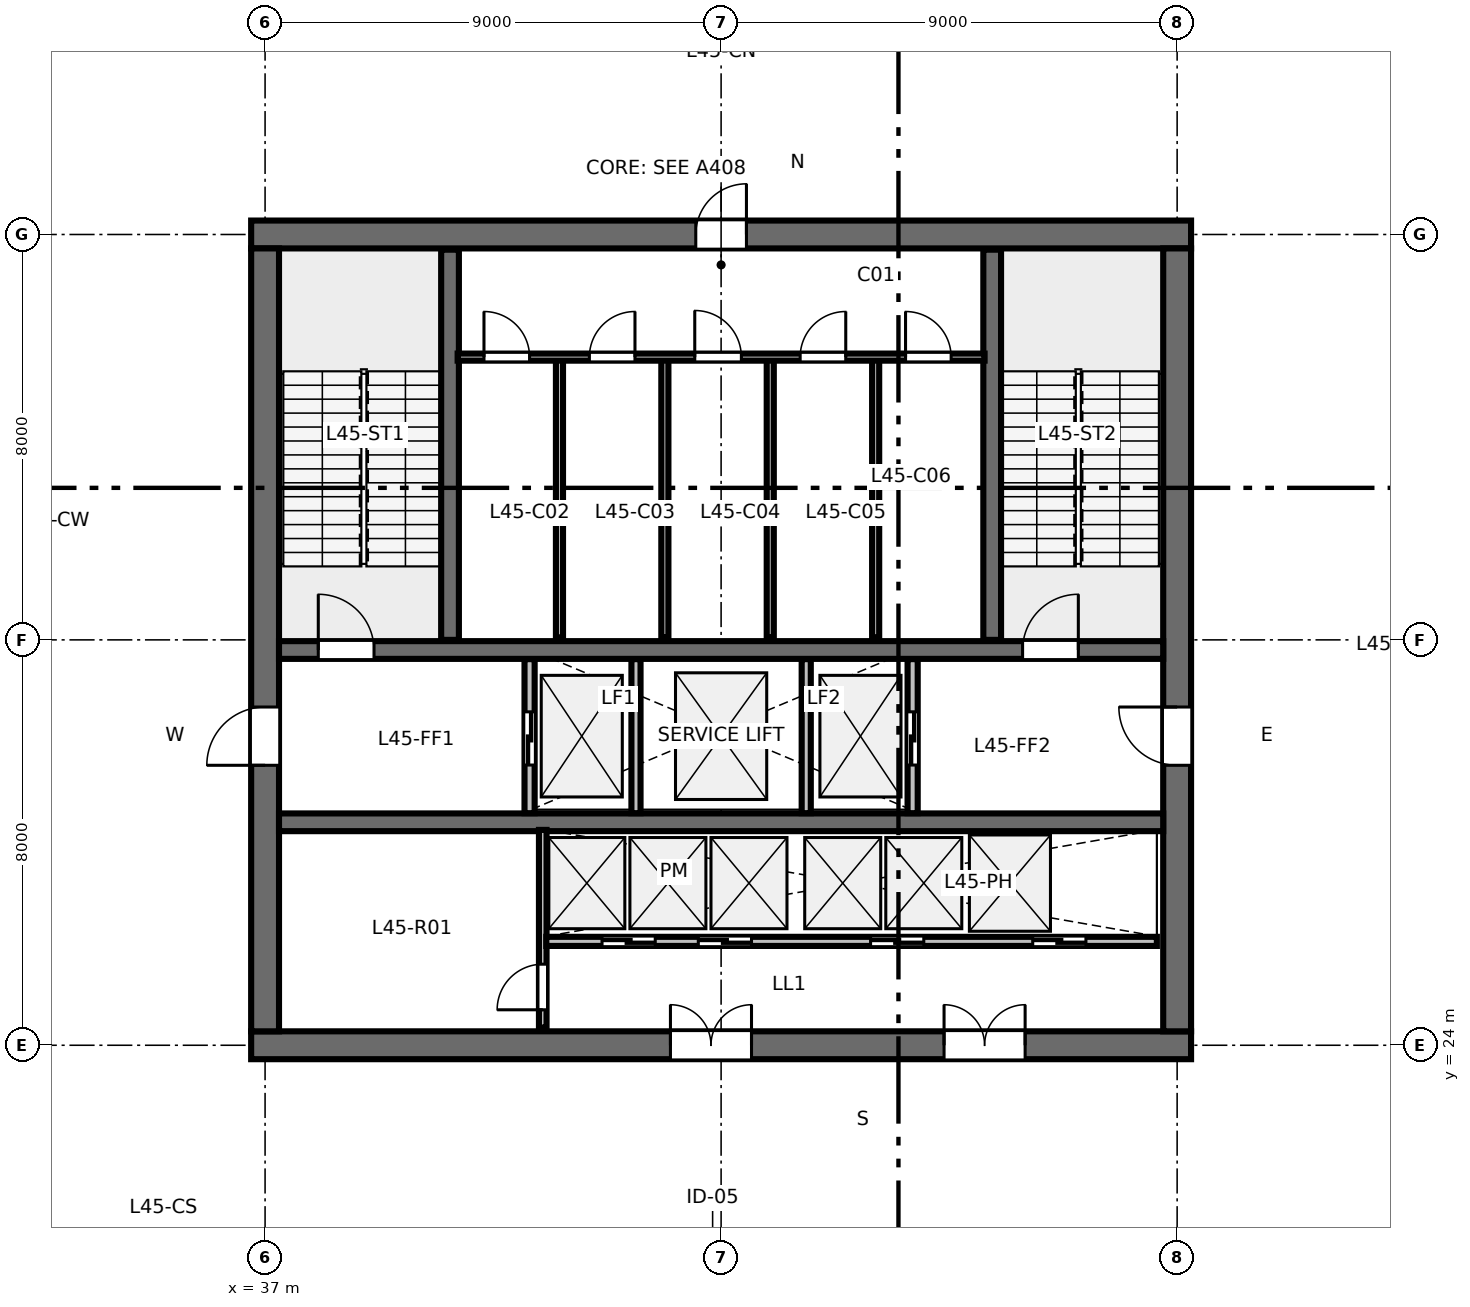
"""IFC4 building model, lengths in metres.
Left out: names, types, materials, properties, quantities, classifications, styles, units other than length and angle.
Written with IfcOpenShell. Run it as: python <this file> out.ifc"""

import sys

from ifc_helpers import new_model, si_unit, direction, frame, frame_2d, origin, place, context, subcontext, project, spatial, rectangle, extrude, element, fill, save


model = new_model("IFC4")
c1 = context("Model", 3, precision=1e-05, world=origin(), true_north=direction((0.0, 1.0)))
c2 = subcontext(c1, "Body", "Model", "MODEL_VIEW")
j1 = project(units=[si_unit("LENGTHUNIT", "METRE"), si_unit("PLANEANGLEUNIT", "RADIAN")], contexts=[c1])
p1 = place(None, origin())
s1 = spatial("IfcSite", under=j1, at=p1, CompositionType="ELEMENT")
p2 = place(p1, origin())
s2 = spatial("IfcBuilding", under=s1, at=p2, CompositionType="ELEMENT")
p3 = place(p2, frame((0.0, 0.0, 172.0)))
s3 = spatial("IfcBuildingStorey", under=s2, at=p3, CompositionType="ELEMENT", Elevation=172.0)
p4 = place(p3, frame((36.725, 24.0, 0.0), z_axis=(0.0, 0.0, 1.0), x_axis=(1.0, 0.0, 0.0)))
e1 = element("IfcWall", 1, at=p4, inside=s3, PredefinedType="SHEAR", context=c2, shape_type="SweptSolid", body=[
    extrude(rectangle(XDim=18.55, YDim=0.55, at=frame_2d((9.275, 0.0))), origin(), (0.0, 0.0, 1.0), 4.76),
])
p5 = place(p4, frame((8.275, 0.0, 0.0)))
e2 = element("IfcOpeningElement", 2, at=p5, cuts=e1, PredefinedType="OPENING", context=c2, shape_type="SweptSolid", body=[
    extrude(rectangle(XDim=1.6, YDim=2.15, at=frame_2d((0.8, 1.075))), frame((0.0, 0.285, 0.0), z_axis=(0.0, -1.0, 0.0), x_axis=(1.0, 0.0, 0.0)), (0.0, 0.0, 1.0), 0.57),
])
p6 = place(p4, frame((13.675, 0.0, 0.0)))
e3 = element("IfcOpeningElement", 3, at=p6, cuts=e1, PredefinedType="OPENING", context=c2, shape_type="SweptSolid", body=[
    extrude(rectangle(XDim=1.6, YDim=2.15, at=frame_2d((0.8, 1.075))), frame((0.0, 0.285, 0.0), z_axis=(0.0, -1.0, 0.0), x_axis=(1.0, 0.0, 0.0)), (0.0, 0.0, 1.0), 0.57),
])
p7 = place(p3, frame((36.725, 40.0, 0.0), z_axis=(0.0, 0.0, 1.0), x_axis=(1.0, 0.0, 0.0)))
e4 = element("IfcWall", 4, at=p7, inside=s3, PredefinedType="SHEAR", context=c2, shape_type="SweptSolid", body=[
    extrude(rectangle(XDim=18.55, YDim=0.55, at=frame_2d((9.275, 0.0))), origin(), (0.0, 0.0, 1.0), 4.76),
])
p8 = place(p7, frame((8.775, 0.0, 0.0)))
e5 = element("IfcOpeningElement", 5, at=p8, cuts=e4, PredefinedType="OPENING", context=c2, shape_type="SweptSolid", body=[
    extrude(rectangle(XDim=1.0, YDim=2.15, at=frame_2d((0.5, 1.075))), frame((0.0, 0.285, 0.0), z_axis=(0.0, -1.0, 0.0), x_axis=(1.0, 0.0, 0.0)), (0.0, 0.0, 1.0), 0.57),
])
p9 = place(p3, frame((37.0, 24.275, 0.0), z_axis=(0.0, 0.0, 1.0), x_axis=(0.0, 1.0, 0.0)))
e6 = element("IfcWall", 6, at=p9, inside=s3, PredefinedType="SHEAR", context=c2, shape_type="SweptSolid", body=[
    extrude(rectangle(XDim=15.45, YDim=0.55, at=frame_2d((7.725, 0.0))), origin(), (0.0, 0.0, 1.0), 4.76),
])
p10 = place(p9, frame((5.25, 0.0, 0.0)))
e7 = element("IfcOpeningElement", 7, at=p10, cuts=e6, PredefinedType="OPENING", context=c2, shape_type="SweptSolid", body=[
    extrude(rectangle(XDim=1.15, YDim=2.15, at=frame_2d((0.575, 1.075))), frame((0.0, 0.285, 0.0), z_axis=(0.0, -1.0, 0.0), x_axis=(1.0, 0.0, 0.0)), (0.0, 0.0, 1.0), 0.57),
])
p11 = place(p3, frame((55.0, 24.275, 0.0), z_axis=(0.0, 0.0, 1.0), x_axis=(0.0, 1.0, 0.0)))
e8 = element("IfcWall", 8, at=p11, inside=s3, PredefinedType="SHEAR", context=c2, shape_type="SweptSolid", body=[
    extrude(rectangle(XDim=15.45, YDim=0.55, at=frame_2d((7.725, 0.0))), origin(), (0.0, 0.0, 1.0), 4.76),
])
p12 = place(p11, frame((5.25, 0.0, 0.0)))
e9 = element("IfcOpeningElement", 9, at=p12, cuts=e8, PredefinedType="OPENING", context=c2, shape_type="SweptSolid", body=[
    extrude(rectangle(XDim=1.15, YDim=2.15, at=frame_2d((0.575, 1.075))), frame((0.0, 0.285, 0.0), z_axis=(0.0, -1.0, 0.0), x_axis=(1.0, 0.0, 0.0)), (0.0, 0.0, 1.0), 0.57),
])
p13 = place(p3, frame((37.275, 31.8, 0.0), z_axis=(0.0, 0.0, 1.0), x_axis=(1.0, 0.0, 0.0)))
e10 = element("IfcWall", 10, at=p13, inside=s3, PredefinedType="SHEAR", context=c2, shape_type="SweptSolid", body=[
    extrude(rectangle(XDim=17.45, YDim=0.35, at=frame_2d((8.725, 0.0))), origin(), (0.0, 0.0, 1.0), 4.76),
])
p14 = place(p13, frame((0.775, 0.0, 0.0)))
e11 = element("IfcOpeningElement", 11, at=p14, cuts=e10, PredefinedType="OPENING", context=c2, shape_type="SweptSolid", body=[
    extrude(rectangle(XDim=1.1, YDim=2.15, at=frame_2d((0.55, 1.075))), frame((0.0, 0.185, 0.0), z_axis=(0.0, -1.0, 0.0), x_axis=(1.0, 0.0, 0.0)), (0.0, 0.0, 1.0), 0.37),
])
p15 = place(p13, frame((14.675, 0.0, 0.0)))
e12 = element("IfcOpeningElement", 12, at=p15, cuts=e10, PredefinedType="OPENING", context=c2, shape_type="SweptSolid", body=[
    extrude(rectangle(XDim=1.1, YDim=2.15, at=frame_2d((0.55, 1.075))), frame((0.0, 0.185, 0.0), z_axis=(0.0, -1.0, 0.0), x_axis=(1.0, 0.0, 0.0)), (0.0, 0.0, 1.0), 0.37),
])
p16 = place(p3, frame((37.275, 28.4, 0.0), z_axis=(0.0, 0.0, 1.0), x_axis=(1.0, 0.0, 0.0)))
e13 = element("IfcWall", 13, at=p16, inside=s3, PredefinedType="SHEAR", context=c2, shape_type="SweptSolid", body=[
    extrude(rectangle(XDim=17.45, YDim=0.35, at=frame_2d((8.725, 0.0))), origin(), (0.0, 0.0, 1.0), 4.76),
])
for number, where, z_axis, x_axis in (
    (14, (40.65, 32.0, 0.0), (0.0, 0.0, 1.0), (0.0, 1.0, 0.0)),
    (15, (51.35, 32.0, 0.0), (0.0, 0.0, 1.0), (0.0, 1.0, 0.0)),
):
    element("IfcWall", number, at=place(p3, frame(where, z_axis=z_axis, x_axis=x_axis)), inside=s3, PredefinedType="SHEAR", context=c2, shape_type="SweptSolid", body=[
        extrude(rectangle(XDim=7.7, YDim=0.35, at=frame_2d((3.85, 0.0))), origin(), (0.0, 0.0, 1.0), 5.0),
    ])
for number, where, z_axis, x_axis in (
    (16, (42.81, 32.05, 0.0), (0.0, 0.0, 1.0), (0.0, 1.0, 0.0)),
    (17, (44.89, 32.05, 0.0), (0.0, 0.0, 1.0), (0.0, 1.0, 0.0)),
    (18, (46.97, 32.05, 0.0), (0.0, 0.0, 1.0), (0.0, 1.0, 0.0)),
    (19, (49.05, 32.05, 0.0), (0.0, 0.0, 1.0), (0.0, 1.0, 0.0)),
):
    element("IfcWall", number, at=place(p3, frame(where, z_axis=z_axis, x_axis=x_axis)), inside=s3, PredefinedType="PARTITIONING", context=c2, shape_type="SweptSolid", body=[
        extrude(rectangle(XDim=5.5, YDim=0.14, at=frame_2d((2.75, 0.0))), origin(), (0.0, 0.0, 1.0), 4.76),
    ])
p17 = place(p3, frame((40.8, 37.58, 0.0), z_axis=(0.0, 0.0, 1.0), x_axis=(1.0, 0.0, 0.0)))
e20 = element("IfcWall", 20, at=p17, inside=s3, PredefinedType="PARTITIONING", context=c2, shape_type="SweptSolid", body=[
    extrude(rectangle(XDim=10.4, YDim=0.14, at=frame_2d((5.2, 0.0))), origin(), (0.0, 0.0, 1.0), 4.76),
])
p18 = place(p17, frame((0.52, 0.0, 0.0)))
e21 = element("IfcOpeningElement", 21, at=p18, cuts=e20, PredefinedType="OPENING", context=c2, shape_type="SweptSolid", body=[
    extrude(rectangle(XDim=0.9, YDim=2.15, at=frame_2d((0.45, 1.075))), frame((0.0, 0.08, 0.0), z_axis=(0.0, -1.0, 0.0), x_axis=(1.0, 0.0, 0.0)), (0.0, 0.0, 1.0), 0.16),
])
p19 = place(p17, frame((2.6, 0.0, 0.0)))
e22 = element("IfcOpeningElement", 22, at=p19, cuts=e20, PredefinedType="OPENING", context=c2, shape_type="SweptSolid", body=[
    extrude(rectangle(XDim=0.9, YDim=2.15, at=frame_2d((0.45, 1.075))), frame((0.0, 0.08, 0.0), z_axis=(0.0, -1.0, 0.0), x_axis=(1.0, 0.0, 0.0)), (0.0, 0.0, 1.0), 0.16),
])
p20 = place(p17, frame((4.68, 0.0, 0.0)))
e23 = element("IfcOpeningElement", 23, at=p20, cuts=e20, PredefinedType="OPENING", context=c2, shape_type="SweptSolid", body=[
    extrude(rectangle(XDim=0.92, YDim=2.15, at=frame_2d((0.46, 1.075))), frame((0.0, 0.08, 0.0), z_axis=(0.0, -1.0, 0.0), x_axis=(1.0, 0.0, 0.0)), (0.0, 0.0, 1.0), 0.16),
])
p21 = place(p17, frame((6.76, 0.0, 0.0)))
e24 = element("IfcOpeningElement", 24, at=p21, cuts=e20, PredefinedType="OPENING", context=c2, shape_type="SweptSolid", body=[
    extrude(rectangle(XDim=0.9, YDim=2.15, at=frame_2d((0.45, 1.075))), frame((0.0, 0.08, 0.0), z_axis=(0.0, -1.0, 0.0), x_axis=(1.0, 0.0, 0.0)), (0.0, 0.0, 1.0), 0.16),
])
p22 = place(p17, frame((8.84, 0.0, 0.0)))
e25 = element("IfcOpeningElement", 25, at=p22, cuts=e20, PredefinedType="OPENING", context=c2, shape_type="SweptSolid", body=[
    extrude(rectangle(XDim=0.9, YDim=2.15, at=frame_2d((0.45, 1.075))), frame((0.0, 0.08, 0.0), z_axis=(0.0, -1.0, 0.0), x_axis=(1.0, 0.0, 0.0)), (0.0, 0.0, 1.0), 0.16),
])
p23 = place(p3, frame((42.22, 28.58, 0.0), z_axis=(0.0, 0.0, 1.0), x_axis=(0.0, 1.0, 0.0)))
e26 = element("IfcWall", 26, at=p23, inside=s3, PredefinedType="PARTITIONING", context=c2, shape_type="SweptSolid", body=[
    extrude(rectangle(XDim=3.04, YDim=0.2, at=frame_2d((1.52, 0.0))), origin(), (0.0, 0.0, 1.0), 4.76),
])
p24 = place(p23, frame((0.95, 0.0, 0.0)))
e27 = element("IfcOpeningElement", 27, at=p24, cuts=e26, PredefinedType="OPENING", context=c2, shape_type="SweptSolid", body=[
    extrude(rectangle(XDim=1.05, YDim=2.15, at=frame_2d((0.525, 1.075))), frame((0.0, 0.11, 0.0), z_axis=(0.0, -1.0, 0.0), x_axis=(1.0, 0.0, 0.0)), (0.0, 0.0, 1.0), 0.22),
])
p25 = place(p3, frame((49.78, 28.58, 0.0), z_axis=(0.0, 0.0, 1.0), x_axis=(0.0, 1.0, 0.0)))
e28 = element("IfcWall", 28, at=p25, inside=s3, PredefinedType="PARTITIONING", context=c2, shape_type="SweptSolid", body=[
    extrude(rectangle(XDim=3.04, YDim=0.2, at=frame_2d((1.52, 0.0))), origin(), (0.0, 0.0, 1.0), 4.76),
])
p26 = place(p25, frame((0.95, 0.0, 0.0)))
e29 = element("IfcOpeningElement", 29, at=p26, cuts=e28, PredefinedType="OPENING", context=c2, shape_type="SweptSolid", body=[
    extrude(rectangle(XDim=1.05, YDim=2.15, at=frame_2d((0.525, 1.075))), frame((0.0, 0.11, 0.0), z_axis=(0.0, -1.0, 0.0), x_axis=(1.0, 0.0, 0.0)), (0.0, 0.0, 1.0), 0.22),
])
for number, where, z_axis, x_axis in (
    (30, (44.32, 28.58, 0.0), (0.0, 0.0, 1.0), (0.0, 1.0, 0.0)),
    (31, (47.68, 28.58, 0.0), (0.0, 0.0, 1.0), (0.0, 1.0, 0.0)),
):
    element("IfcWall", number, at=place(p3, frame(where, z_axis=z_axis, x_axis=x_axis)), inside=s3, PredefinedType="PARTITIONING", context=c2, shape_type="SweptSolid", body=[
        extrude(rectangle(XDim=3.04, YDim=0.18, at=frame_2d((1.52, 0.0))), origin(), (0.0, 0.0, 1.0), 4.76),
    ])
p27 = place(p3, frame((42.48, 24.35, 0.0), z_axis=(0.0, 0.0, 1.0), x_axis=(0.0, 1.0, 0.0)))
e32 = element("IfcWall", 32, at=p27, inside=s3, PredefinedType="PARTITIONING", context=c2, shape_type="SweptSolid", body=[
    extrude(rectangle(XDim=3.9, YDim=0.15, at=frame_2d((1.95, 0.0))), origin(), (0.0, 0.0, 1.0), 4.76),
])
p28 = place(p27, frame((0.35, 0.0, 0.0)))
e33 = element("IfcOpeningElement", 33, at=p28, cuts=e32, PredefinedType="OPENING", context=c2, shape_type="SweptSolid", body=[
    extrude(rectangle(XDim=0.9, YDim=2.15, at=frame_2d((0.45, 1.075))), frame((0.0, 0.085, 0.0), z_axis=(0.0, -1.0, 0.0), x_axis=(1.0, 0.0, 0.0)), (0.0, 0.0, 1.0), 0.17),
])
p29 = place(p3, frame((42.55, 26.05, 0.0), z_axis=(0.0, 0.0, 1.0), x_axis=(1.0, 0.0, 0.0)))
e34 = element("IfcWall", 34, at=p29, inside=s3, PredefinedType="PARTITIONING", context=c2, shape_type="SweptSolid", body=[
    extrude(rectangle(XDim=12.05, YDim=0.18, at=frame_2d((6.025, 0.0))), origin(), (0.0, 0.0, 1.0), 4.76),
])
p30 = place(p29, frame((1.1, 0.0, 0.0)))
e35 = element("IfcOpeningElement", 35, at=p30, cuts=e34, PredefinedType="OPENING", context=c2, shape_type="SweptSolid", body=[
    extrude(rectangle(XDim=1.05, YDim=2.15, at=frame_2d((0.525, 1.075))), frame((0.0, 0.1, 0.0), z_axis=(0.0, -1.0, 0.0), x_axis=(1.0, 0.0, 0.0)), (0.0, 0.0, 1.0), 0.2),
])
p31 = place(p29, frame((3.0, 0.0, 0.0)))
e36 = element("IfcOpeningElement", 36, at=p31, cuts=e34, PredefinedType="OPENING", context=c2, shape_type="SweptSolid", body=[
    extrude(rectangle(XDim=1.05, YDim=2.15, at=frame_2d((0.525, 1.075))), frame((0.0, 0.1, 0.0), z_axis=(0.0, -1.0, 0.0), x_axis=(1.0, 0.0, 0.0)), (0.0, 0.0, 1.0), 0.2),
])
p32 = place(p29, frame((6.4, 0.0, 0.0)))
e37 = element("IfcOpeningElement", 37, at=p32, cuts=e34, PredefinedType="OPENING", context=c2, shape_type="SweptSolid", body=[
    extrude(rectangle(XDim=1.05, YDim=2.15, at=frame_2d((0.525, 1.075))), frame((0.0, 0.1, 0.0), z_axis=(0.0, -1.0, 0.0), x_axis=(1.0, 0.0, 0.0)), (0.0, 0.0, 1.0), 0.2),
])
p33 = place(p29, frame((9.6, 0.0, 0.0)))
e38 = element("IfcOpeningElement", 38, at=p33, cuts=e34, PredefinedType="OPENING", context=c2, shape_type="SweptSolid", body=[
    extrude(rectangle(XDim=1.05, YDim=2.15, at=frame_2d((0.525, 1.075))), frame((0.0, 0.1, 0.0), z_axis=(0.0, -1.0, 0.0), x_axis=(1.0, 0.0, 0.0)), (0.0, 0.0, 1.0), 0.2),
])
p34 = place(p14, origin())
e39 = element("IfcDoor", 39, at=p34, inside=s3, OperationType="SINGLE_SWING_LEFT", PredefinedType="DOOR", context=c2, shape_type="SweptSolid", body=[
    extrude(rectangle(XDim=1.1, YDim=2.15, at=frame_2d((0.55, 1.075))), frame((0.0, 0.025, 0.0), z_axis=(0.0, -1.0, 0.0), x_axis=(1.0, 0.0, 0.0)), (0.0, 0.0, 1.0), 0.05),
])
fill(e11, e39)
p35 = place(p15, origin())
e40 = element("IfcDoor", 40, at=p35, inside=s3, OperationType="SINGLE_SWING_RIGHT", PredefinedType="DOOR", context=c2, shape_type="SweptSolid", body=[
    extrude(rectangle(XDim=1.1, YDim=2.15, at=frame_2d((0.55, 1.075))), frame((0.0, 0.025, 0.0), z_axis=(0.0, -1.0, 0.0), x_axis=(1.0, 0.0, 0.0)), (0.0, 0.0, 1.0), 0.05),
])
fill(e12, e40)
p36 = place(p8, origin())
e41 = element("IfcDoor", 41, at=p36, inside=s3, OperationType="SINGLE_SWING_RIGHT", PredefinedType="DOOR", context=c2, shape_type="SweptSolid", body=[
    extrude(rectangle(XDim=1.0, YDim=2.15, at=frame_2d((0.5, 1.075))), frame((0.0, 0.025, 0.0), z_axis=(0.0, -1.0, 0.0), x_axis=(1.0, 0.0, 0.0)), (0.0, 0.0, 1.0), 0.05),
])
fill(e5, e41)
p37 = place(p10, origin())
e42 = element("IfcDoor", 42, at=p37, inside=s3, OperationType="SINGLE_SWING_LEFT", PredefinedType="DOOR", context=c2, shape_type="SweptSolid", body=[
    extrude(rectangle(XDim=1.15, YDim=2.15, at=frame_2d((0.575, 1.075))), frame((0.0, 0.025, 0.0), z_axis=(0.0, -1.0, 0.0), x_axis=(1.0, 0.0, 0.0)), (0.0, 0.0, 1.0), 0.05),
])
fill(e7, e42)
p38 = place(p12, origin())
e43 = element("IfcDoor", 43, at=p38, inside=s3, OperationType="SINGLE_SWING_RIGHT", PredefinedType="DOOR", context=c2, shape_type="SweptSolid", body=[
    extrude(rectangle(XDim=1.15, YDim=2.15, at=frame_2d((0.575, 1.075))), frame((0.0, 0.025, 0.0), z_axis=(0.0, -1.0, 0.0), x_axis=(1.0, 0.0, 0.0)), (0.0, 0.0, 1.0), 0.05),
])
fill(e9, e43)
p39 = place(p5, origin())
e44 = element("IfcDoor", 44, at=p39, inside=s3, OperationType="DOUBLE_DOOR_SINGLE_SWING", PredefinedType="DOOR", context=c2, shape_type="SweptSolid", body=[
    extrude(rectangle(XDim=1.6, YDim=2.15, at=frame_2d((0.8, 1.075))), frame((0.0, 0.025, 0.0), z_axis=(0.0, -1.0, 0.0), x_axis=(1.0, 0.0, 0.0)), (0.0, 0.0, 1.0), 0.05),
])
fill(e2, e44)
p40 = place(p6, origin())
e45 = element("IfcDoor", 45, at=p40, inside=s3, OperationType="DOUBLE_DOOR_SINGLE_SWING", PredefinedType="DOOR", context=c2, shape_type="SweptSolid", body=[
    extrude(rectangle(XDim=1.6, YDim=2.15, at=frame_2d((0.8, 1.075))), frame((0.0, 0.025, 0.0), z_axis=(0.0, -1.0, 0.0), x_axis=(1.0, 0.0, 0.0)), (0.0, 0.0, 1.0), 0.05),
])
fill(e3, e45)
p41 = place(p18, origin())
e46 = element("IfcDoor", 46, at=p41, inside=s3, OperationType="SINGLE_SWING_LEFT", PredefinedType="DOOR", context=c2, shape_type="SweptSolid", body=[
    extrude(rectangle(XDim=0.9, YDim=2.15, at=frame_2d((0.45, 1.075))), frame((0.0, 0.025, 0.0), z_axis=(0.0, -1.0, 0.0), x_axis=(1.0, 0.0, 0.0)), (0.0, 0.0, 1.0), 0.05),
])
fill(e21, e46)
p42 = place(p19, origin())
e47 = element("IfcDoor", 47, at=p42, inside=s3, OperationType="SINGLE_SWING_RIGHT", PredefinedType="DOOR", context=c2, shape_type="SweptSolid", body=[
    extrude(rectangle(XDim=0.9, YDim=2.15, at=frame_2d((0.45, 1.075))), frame((0.0, 0.025, 0.0), z_axis=(0.0, -1.0, 0.0), x_axis=(1.0, 0.0, 0.0)), (0.0, 0.0, 1.0), 0.05),
])
fill(e22, e47)
p43 = place(p20, origin())
e48 = element("IfcDoor", 48, at=p43, inside=s3, OperationType="SINGLE_SWING_LEFT", PredefinedType="DOOR", context=c2, shape_type="SweptSolid", body=[
    extrude(rectangle(XDim=0.92, YDim=2.15, at=frame_2d((0.46, 1.075))), frame((0.0, 0.025, 0.0), z_axis=(0.0, -1.0, 0.0), x_axis=(1.0, 0.0, 0.0)), (0.0, 0.0, 1.0), 0.05),
])
fill(e23, e48)
p44 = place(p21, origin())
e49 = element("IfcDoor", 49, at=p44, inside=s3, OperationType="SINGLE_SWING_RIGHT", PredefinedType="DOOR", context=c2, shape_type="SweptSolid", body=[
    extrude(rectangle(XDim=0.9, YDim=2.15, at=frame_2d((0.45, 1.075))), frame((0.0, 0.025, 0.0), z_axis=(0.0, -1.0, 0.0), x_axis=(1.0, 0.0, 0.0)), (0.0, 0.0, 1.0), 0.05),
])
fill(e24, e49)
p45 = place(p22, origin())
e50 = element("IfcDoor", 50, at=p45, inside=s3, OperationType="SINGLE_SWING_LEFT", PredefinedType="DOOR", context=c2, shape_type="SweptSolid", body=[
    extrude(rectangle(XDim=0.9, YDim=2.15, at=frame_2d((0.45, 1.075))), frame((0.0, 0.025, 0.0), z_axis=(0.0, -1.0, 0.0), x_axis=(1.0, 0.0, 0.0)), (0.0, 0.0, 1.0), 0.05),
])
fill(e25, e50)
p46 = place(p24, origin())
e51 = element("IfcDoor", 51, at=p46, inside=s3, OperationType="SLIDING_TO_LEFT", PredefinedType="DOOR", context=c2, shape_type="SweptSolid", body=[
    extrude(rectangle(XDim=1.05, YDim=2.15, at=frame_2d((0.525, 1.075))), frame((0.0, 0.025, 0.0), z_axis=(0.0, -1.0, 0.0), x_axis=(1.0, 0.0, 0.0)), (0.0, 0.0, 1.0), 0.05),
])
fill(e27, e51)
p47 = place(p26, origin())
e52 = element("IfcDoor", 52, at=p47, inside=s3, OperationType="SLIDING_TO_RIGHT", PredefinedType="DOOR", context=c2, shape_type="SweptSolid", body=[
    extrude(rectangle(XDim=1.05, YDim=2.15, at=frame_2d((0.525, 1.075))), frame((0.0, 0.025, 0.0), z_axis=(0.0, -1.0, 0.0), x_axis=(1.0, 0.0, 0.0)), (0.0, 0.0, 1.0), 0.05),
])
fill(e29, e52)
p48 = place(p28, origin())
e53 = element("IfcDoor", 53, at=p48, inside=s3, OperationType="SINGLE_SWING_LEFT", PredefinedType="DOOR", context=c2, shape_type="SweptSolid", body=[
    extrude(rectangle(XDim=0.9, YDim=2.15, at=frame_2d((0.45, 1.075))), frame((0.0, 0.025, 0.0), z_axis=(0.0, -1.0, 0.0), x_axis=(1.0, 0.0, 0.0)), (0.0, 0.0, 1.0), 0.05),
])
fill(e33, e53)
p49 = place(p30, origin())
e54 = element("IfcDoor", 54, at=p49, inside=s3, OperationType="SLIDING_TO_LEFT", PredefinedType="DOOR", context=c2, shape_type="SweptSolid", body=[
    extrude(rectangle(XDim=1.05, YDim=2.15, at=frame_2d((0.525, 1.075))), frame((0.0, 0.025, 0.0), z_axis=(0.0, -1.0, 0.0), x_axis=(1.0, 0.0, 0.0)), (0.0, 0.0, 1.0), 0.05),
])
fill(e35, e54)
p50 = place(p31, origin())
e55 = element("IfcDoor", 55, at=p50, inside=s3, OperationType="SLIDING_TO_RIGHT", PredefinedType="DOOR", context=c2, shape_type="SweptSolid", body=[
    extrude(rectangle(XDim=1.05, YDim=2.15, at=frame_2d((0.525, 1.075))), frame((0.0, 0.025, 0.0), z_axis=(0.0, -1.0, 0.0), x_axis=(1.0, 0.0, 0.0)), (0.0, 0.0, 1.0), 0.05),
])
fill(e36, e55)
p51 = place(p32, origin())
e56 = element("IfcDoor", 56, at=p51, inside=s3, OperationType="SLIDING_TO_LEFT", PredefinedType="DOOR", context=c2, shape_type="SweptSolid", body=[
    extrude(rectangle(XDim=1.05, YDim=2.15, at=frame_2d((0.525, 1.075))), frame((0.0, 0.025, 0.0), z_axis=(0.0, -1.0, 0.0), x_axis=(1.0, 0.0, 0.0)), (0.0, 0.0, 1.0), 0.05),
])
fill(e37, e56)
p52 = place(p33, origin())
e57 = element("IfcDoor", 57, at=p52, inside=s3, OperationType="SLIDING_TO_RIGHT", PredefinedType="DOOR", context=c2, shape_type="SweptSolid", body=[
    extrude(rectangle(XDim=1.05, YDim=2.15, at=frame_2d((0.525, 1.075))), frame((0.0, 0.025, 0.0), z_axis=(0.0, -1.0, 0.0), x_axis=(1.0, 0.0, 0.0)), (0.0, 0.0, 1.0), 0.05),
])
fill(e38, e57)
save(model, sys.argv[1])
